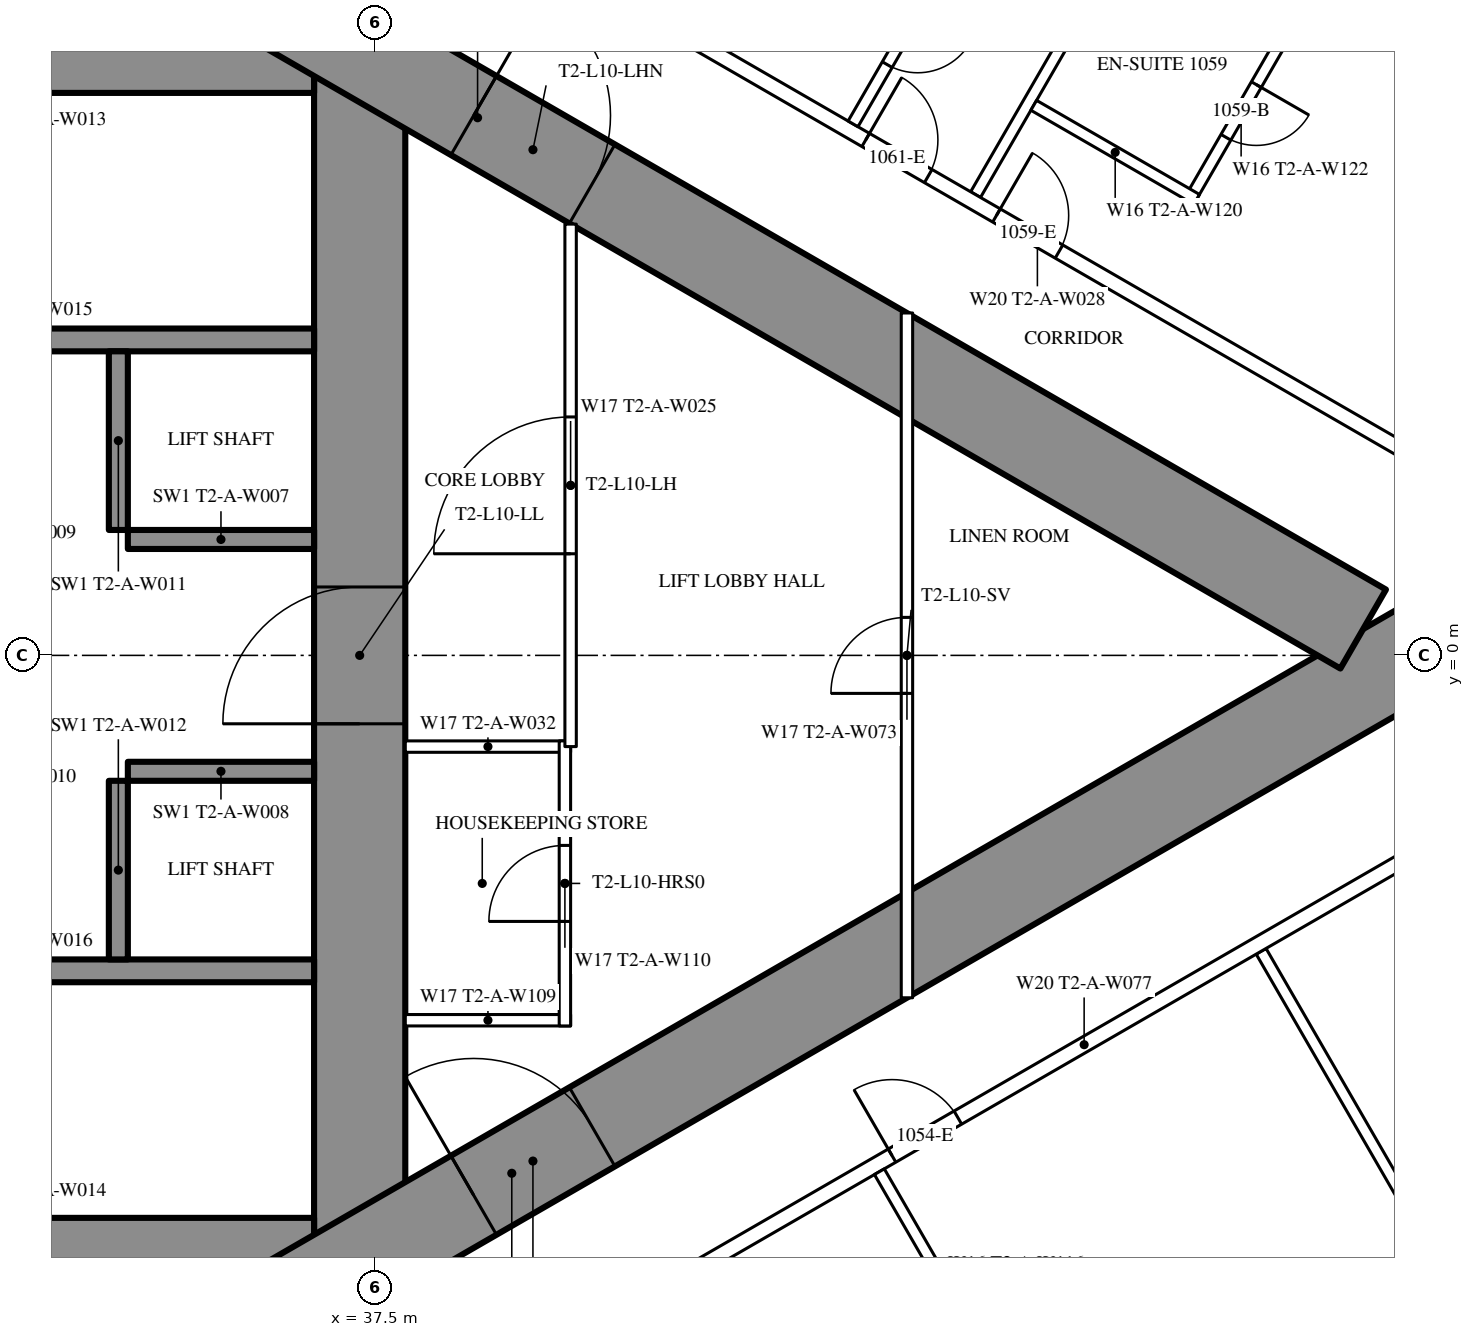
"""IFC4 building model, lengths in metres.
Left out: names, types, materials, properties, quantities, classifications, styles, units other than length and angle.
Written with IfcOpenShell. Run it as: python <this file> out.ifc"""

import sys

from ifc_helpers import new_model, si_unit, direction, frame, frame_2d, origin, place, context, subcontext, project, spatial, rectangle, extrude, element, fill, save


model = new_model("IFC4")
c1 = context("Model", 3, precision=1e-05, world=origin(), true_north=direction((0.0, 1.0)))
c2 = subcontext(c1, "Body", "Model", "MODEL_VIEW")
j1 = project(units=[si_unit("LENGTHUNIT", "METRE"), si_unit("PLANEANGLEUNIT", "RADIAN")], contexts=[c1])
p1 = place(None, origin())
s1 = spatial("IfcSite", under=j1, at=p1, CompositionType="ELEMENT")
p2 = place(p1, origin())
s2 = spatial("IfcBuilding", under=s1, at=p2, CompositionType="ELEMENT")
p3 = place(p2, frame((0.0, 0.0, 42.5)))
s3 = spatial("IfcBuildingStorey", under=s2, at=p3, CompositionType="ELEMENT", Elevation=42.5)
p4 = place(p3, frame((37.3, -8.6, 0.0), z_axis=(0.0, 0.0, 1.0), x_axis=(0.0, 1.0, 0.0)))
e1 = element("IfcWall", 1, at=p4, inside=s3, PredefinedType="SHEAR", context=c2, shape_type="SweptSolid", body=[
    extrude(rectangle(XDim=17.2, YDim=1.2, at=frame_2d((8.6, 0.0))), origin(), (0.0, 0.0, 1.0), 3.5),
])
p5 = place(p4, frame((7.7, 0.0, 0.0)))
e2 = element("IfcOpeningElement", 2, at=p5, cuts=e1, PredefinedType="OPENING", context=c2, shape_type="SweptSolid", body=[
    extrude(rectangle(XDim=1.8, YDim=2.2, at=frame_2d((0.9, 1.1))), frame((0.0, 0.61, 0.0), z_axis=(0.0, -1.0, 0.0), x_axis=(1.0, 0.0, 0.0)), (0.0, 0.0, 1.0), 1.22),
])
p6 = place(p3, frame((28.3, -8.0, 0.0), z_axis=(0.0, 0.0, 1.0), x_axis=(1.0, 0.0, 0.0)))
e3 = element("IfcWall", 3, at=p6, inside=s3, PredefinedType="SHEAR", context=c2, shape_type="SweptSolid", body=[
    extrude(rectangle(XDim=8.4, YDim=1.2, at=frame_2d((4.2, 0.0))), origin(), (0.0, 0.0, 1.0), 3.5),
])
p7 = place(p6, frame((0.25, 0.0, 0.0)))
e4 = element("IfcOpeningElement", 4, at=p7, cuts=e3, PredefinedType="OPENING", context=c2, shape_type="SweptSolid", body=[
    extrude(rectangle(XDim=1.0, YDim=2.2, at=frame_2d((0.5, 1.1))), frame((0.0, 0.61, 0.0), z_axis=(0.0, -1.0, 0.0), x_axis=(1.0, 0.0, 0.0)), (0.0, 0.0, 1.0), 1.22),
])
p8 = place(p3, frame((28.3, 8.0, 0.0), z_axis=(0.0, 0.0, 1.0), x_axis=(1.0, 0.0, 0.0)))
e5 = element("IfcWall", 5, at=p8, inside=s3, PredefinedType="SHEAR", context=c2, shape_type="SweptSolid", body=[
    extrude(rectangle(XDim=8.4, YDim=1.2, at=frame_2d((4.2, 0.0))), origin(), (0.0, 0.0, 1.0), 3.5),
])
p9 = place(p8, frame((0.25, 0.0, 0.0)))
e6 = element("IfcOpeningElement", 6, at=p9, cuts=e5, PredefinedType="OPENING", context=c2, shape_type="SweptSolid", body=[
    extrude(rectangle(XDim=1.0, YDim=2.2, at=frame_2d((0.5, 1.1))), frame((0.0, 0.61, 0.0), z_axis=(0.0, -1.0, 0.0), x_axis=(1.0, 0.0, 0.0)), (0.0, 0.0, 1.0), 1.22),
])
for number, where, z_axis, x_axis in (
    (7, (28.3, -4.15, 0.0), (0.0, 0.0, 1.0), (1.0, 0.0, 0.0)),
    (8, (28.3, 4.15, 0.0), (0.0, 0.0, 1.0), (1.0, 0.0, 0.0)),
):
    element("IfcWall", number, at=place(p3, frame(where, z_axis=z_axis, x_axis=x_axis)), inside=s3, PredefinedType="SHEAR", context=c2, shape_type="SweptSolid", body=[
        extrude(rectangle(XDim=8.4, YDim=0.3, at=frame_2d((4.2, 0.0))), origin(), (0.0, 0.0, 1.0), 3.5),
    ])
p10 = place(p3, frame((34.125, -4.0, 0.0), z_axis=(0.0, 0.0, 1.0), x_axis=(0.0, 1.0, 0.0)))
e9 = element("IfcWall", 9, at=p10, inside=s3, PredefinedType="SHEAR", context=c2, shape_type="SweptSolid", body=[
    extrude(rectangle(XDim=2.35, YDim=0.25, at=frame_2d((1.175, 0.0))), origin(), (0.0, 0.0, 1.0), 3.5),
])
p11 = place(p3, frame((34.25, -1.525, 0.0), z_axis=(0.0, 0.0, 1.0), x_axis=(1.0, 0.0, 0.0)))
e10 = element("IfcWall", 10, at=p11, inside=s3, PredefinedType="SHEAR", context=c2, shape_type="SweptSolid", body=[
    extrude(rectangle(XDim=2.45, YDim=0.25, at=frame_2d((1.225, 0.0))), origin(), (0.0, 0.0, 1.0), 3.5),
])
p12 = place(p3, frame((34.125, 1.65, 0.0), z_axis=(0.0, 0.0, 1.0), x_axis=(0.0, 1.0, 0.0)))
e11 = element("IfcWall", 11, at=p12, inside=s3, PredefinedType="SHEAR", context=c2, shape_type="SweptSolid", body=[
    extrude(rectangle(XDim=2.35, YDim=0.25, at=frame_2d((1.175, 0.0))), origin(), (0.0, 0.0, 1.0), 3.5),
])
p13 = place(p3, frame((34.25, 1.525, 0.0), z_axis=(0.0, 0.0, 1.0), x_axis=(1.0, 0.0, 0.0)))
e12 = element("IfcWall", 12, at=p13, inside=s3, PredefinedType="SHEAR", context=c2, shape_type="SweptSolid", body=[
    extrude(rectangle(XDim=2.45, YDim=0.25, at=frame_2d((1.225, 0.0))), origin(), (0.0, 0.0, 1.0), 3.5),
])
p14 = place(p3, frame((27.2, -13.8, 0.0), z_axis=(0.0, 0.0, 1.0), x_axis=(0.866027159892, 0.499996958321, 0.0)))
e13 = element("IfcWall", 13, at=p14, inside=s3, PredefinedType="SHEAR", context=c2, shape_type="SweptSolid", body=[
    extrude(rectangle(XDim=27.947, YDim=1.2, at=frame_2d((13.973, 0.0))), origin(), (0.0, 0.0, 1.0), 3.5),
])
p15 = place(p14, frame((4.6, 0.0, 0.0)))
e14 = element("IfcOpeningElement", 14, at=p15, cuts=e13, PredefinedType="OPENING", context=c2, shape_type="SweptSolid", body=[
    extrude(rectangle(XDim=1.0, YDim=2.2, at=frame_2d((0.5, 1.1))), frame((0.0, 0.61, 0.0), z_axis=(0.0, -1.0, 0.0), x_axis=(1.0, 0.0, 0.0)), (0.0, 0.0, 1.0), 1.22),
])
p16 = place(p14, frame((13.395, 0.0, 0.0)))
e15 = element("IfcOpeningElement", 15, at=p16, cuts=e13, PredefinedType="OPENING", context=c2, shape_type="SweptSolid", body=[
    extrude(rectangle(XDim=1.8, YDim=2.2, at=frame_2d((0.9, 1.1))), frame((0.0, 0.61, 0.0), z_axis=(0.0, -1.0, 0.0), x_axis=(1.0, 0.0, 0.0)), (0.0, 0.0, 1.0), 1.22),
])
p17 = place(p3, frame((27.2, 13.8, 0.0), z_axis=(0.0, 0.0, 1.0), x_axis=(0.866024515034, -0.500001539357, 0.0)))
e16 = element("IfcWall", 16, at=p17, inside=s3, PredefinedType="SHEAR", context=c2, shape_type="SweptSolid", body=[
    extrude(rectangle(XDim=26.907, YDim=1.2, at=frame_2d((13.454, 0.0))), origin(), (0.0, 0.0, 1.0), 3.5),
])
p18 = place(p17, frame((4.6, 0.0, 0.0)))
e17 = element("IfcOpeningElement", 17, at=p18, cuts=e16, PredefinedType="OPENING", context=c2, shape_type="SweptSolid", body=[
    extrude(rectangle(XDim=1.0, YDim=2.2, at=frame_2d((0.5, 1.1))), frame((0.0, 0.61, 0.0), z_axis=(0.0, -1.0, 0.0), x_axis=(1.0, 0.0, 0.0)), (0.0, 0.0, 1.0), 1.22),
])
p19 = place(p17, frame((13.395, 0.0, 0.0)))
e18 = element("IfcOpeningElement", 18, at=p19, cuts=e16, PredefinedType="OPENING", context=c2, shape_type="SweptSolid", body=[
    extrude(rectangle(XDim=1.8, YDim=2.2, at=frame_2d((0.9, 1.1))), frame((0.0, 0.61, 0.0), z_axis=(0.0, -1.0, 0.0), x_axis=(1.0, 0.0, 0.0)), (0.0, 0.0, 1.0), 1.22),
])
p20 = place(p3, frame((49.159, -3.893, 0.0), z_axis=(0.0, 0.0, 1.0), x_axis=(0.499998773722, -0.866026111775, 0.0)))
e19 = element("IfcWall", 19, at=p20, inside=s3, PredefinedType="PARTITIONING", context=c2, shape_type="SweptSolid", body=[
    extrude(rectangle(XDim=9.892, YDim=0.15, at=frame_2d((4.946, 0.0))), origin(), (0.0, 0.0, 1.0), 2.25),
])
p21 = place(p3, frame((45.403, 6.062, 0.0), z_axis=(0.0, 0.0, 1.0), x_axis=(0.500013434677, 0.866017647131, 0.0)))
e20 = element("IfcWall", 20, at=p21, inside=s3, PredefinedType="PARTITIONING", context=c2, shape_type="SweptSolid", body=[
    extrude(rectangle(XDim=9.902, YDim=0.15, at=frame_2d((4.951, 0.0))), origin(), (0.0, 0.0, 1.0), 2.25),
])
p22 = place(p3, frame((37.96, -10.243, 0.0), z_axis=(0.0, 0.0, 1.0), x_axis=(0.866026429433, 0.499998223521, 0.0)))
e21 = element("IfcWall", 21, at=p22, inside=s3, PredefinedType="PARTITIONING", context=c2, shape_type="SweptSolid", body=[
    extrude(rectangle(XDim=20.487, YDim=0.2, at=frame_2d((10.243, 0.0))), origin(), (0.0, 0.0, 1.0), 3.25),
])
p23 = place(p22, frame((7.325, 0.0, 0.0)))
e22 = element("IfcOpeningElement", 22, at=p23, cuts=e21, PredefinedType="OPENING", context=c2, shape_type="SweptSolid", body=[
    extrude(rectangle(XDim=1.0, YDim=2.2, at=frame_2d((0.5, 1.1))), frame((0.0, 0.11, 0.0), z_axis=(0.0, -1.0, 0.0), x_axis=(1.0, 0.0, 0.0)), (0.0, 0.0, 1.0), 0.22),
])
p24 = place(p22, frame((18.937, 0.0, 0.0)))
e23 = element("IfcOpeningElement", 23, at=p24, cuts=e21, PredefinedType="OPENING", context=c2, shape_type="SweptSolid", body=[
    extrude(rectangle(XDim=0.95, YDim=2.2, at=frame_2d((0.475, 1.1))), frame((0.0, 0.11, 0.0), z_axis=(0.0, -1.0, 0.0), x_axis=(1.0, 0.0, 0.0)), (0.0, 0.0, 1.0), 0.22),
])
p25 = place(p22, frame((0.6, 0.0, 0.0)))
e24 = element("IfcOpeningElement", 24, at=p25, cuts=e21, PredefinedType="OPENING", context=c2, shape_type="SweptSolid", body=[
    extrude(rectangle(XDim=0.95, YDim=2.2, at=frame_2d((0.475, 1.1))), frame((0.0, 0.11, 0.0), z_axis=(0.0, -1.0, 0.0), x_axis=(1.0, 0.0, 0.0)), (0.0, 0.0, 1.0), 0.22),
])
p26 = place(p3, frame((36.834, 10.894, 0.0), z_axis=(0.0, 0.0, 1.0), x_axis=(0.866028157229, -0.499995230863, 0.0)))
e25 = element("IfcWall", 25, at=p26, inside=s3, PredefinedType="PARTITIONING", context=c2, shape_type="SweptSolid", body=[
    extrude(rectangle(XDim=21.667, YDim=0.2, at=frame_2d((10.833, 0.0))), origin(), (0.0, 0.0, 1.0), 3.25),
])
p27 = place(p26, frame((18.885, 0.0, 0.0)))
e26 = element("IfcOpeningElement", 26, at=p27, cuts=e25, PredefinedType="OPENING", context=c2, shape_type="SweptSolid", body=[
    extrude(rectangle(XDim=0.95, YDim=2.2, at=frame_2d((0.475, 1.1))), frame((0.0, 0.11, 0.0), z_axis=(0.0, -1.0, 0.0), x_axis=(1.0, 0.0, 0.0)), (0.0, 0.0, 1.0), 0.22),
])
p28 = place(p26, frame((10.212, 0.0, 0.0)))
e27 = element("IfcOpeningElement", 27, at=p28, cuts=e25, PredefinedType="OPENING", context=c2, shape_type="SweptSolid", body=[
    extrude(rectangle(XDim=0.95, YDim=2.2, at=frame_2d((0.475, 1.1))), frame((0.0, 0.11, 0.0), z_axis=(0.0, -1.0, 0.0), x_axis=(1.0, 0.0, 0.0)), (0.0, 0.0, 1.0), 0.22),
])
p29 = place(p26, frame((8.225, 0.0, 0.0)))
e28 = element("IfcOpeningElement", 28, at=p29, cuts=e25, PredefinedType="OPENING", context=c2, shape_type="SweptSolid", body=[
    extrude(rectangle(XDim=0.95, YDim=2.2, at=frame_2d((0.475, 1.1))), frame((0.0, 0.11, 0.0), z_axis=(0.0, -1.0, 0.0), x_axis=(1.0, 0.0, 0.0)), (0.0, 0.0, 1.0), 0.22),
])
p30 = place(p26, frame((1.825, 0.0, 0.0)))
e29 = element("IfcOpeningElement", 29, at=p30, cuts=e25, PredefinedType="OPENING", context=c2, shape_type="SweptSolid", body=[
    extrude(rectangle(XDim=0.95, YDim=2.2, at=frame_2d((0.475, 1.1))), frame((0.0, 0.11, 0.0), z_axis=(0.0, -1.0, 0.0), x_axis=(1.0, 0.0, 0.0)), (0.0, 0.0, 1.0), 0.22),
])
p31 = place(p26, frame((0.246, 0.0, 0.0)))
e30 = element("IfcOpeningElement", 30, at=p31, cuts=e25, PredefinedType="OPENING", context=c2, shape_type="SweptSolid", body=[
    extrude(rectangle(XDim=0.9, YDim=2.2, at=frame_2d((0.45, 1.1))), frame((0.0, 0.11, 0.0), z_axis=(0.0, -1.0, 0.0), x_axis=(1.0, 0.0, 0.0)), (0.0, 0.0, 1.0), 0.22),
])
p32 = place(p3, frame((44.137, -6.792, 0.0), z_axis=(0.0, 0.0, 1.0), x_axis=(0.49994636267, -0.866056369097, 0.0)))
e31 = element("IfcWall", 31, at=p32, inside=s3, PredefinedType="PARTITIONING", context=c2, shape_type="SweptSolid", body=[
    extrude(rectangle(XDim=2.8, YDim=0.15, at=frame_2d((1.4, 0.0))), origin(), (0.0, 0.0, 1.0), 3.25),
])
p33 = place(p32, frame((1.55, 0.0, 0.0)))
e32 = element("IfcOpeningElement", 32, at=p33, cuts=e31, PredefinedType="OPENING", context=c2, shape_type="SweptSolid", body=[
    extrude(rectangle(XDim=1.0, YDim=2.2, at=frame_2d((0.5, 1.1))), frame((0.0, 0.085, 0.0), z_axis=(0.0, -1.0, 0.0), x_axis=(1.0, 0.0, 0.0)), (0.0, 0.0, 1.0), 0.17),
])
p34 = place(p3, frame((48.246, 6.037, 0.0), z_axis=(0.0, 0.0, 1.0), x_axis=(0.500006934395, 0.866021400173, 0.0)))
e33 = element("IfcWall", 33, at=p34, inside=s3, PredefinedType="PARTITIONING", context=c2, shape_type="SweptSolid", body=[
    extrude(rectangle(XDim=2.6, YDim=0.15, at=frame_2d((1.3, 0.0))), origin(), (0.0, 0.0, 1.0), 3.25),
])
p35 = place(p34, frame((0.9, 0.0, 0.0)))
e34 = element("IfcOpeningElement", 34, at=p35, cuts=e33, PredefinedType="OPENING", context=c2, shape_type="SweptSolid", body=[
    extrude(rectangle(XDim=0.8, YDim=2.2, at=frame_2d((0.4, 1.1))), frame((0.0, 0.085, 0.0), z_axis=(0.0, -1.0, 0.0), x_axis=(1.0, 0.0, 0.0)), (0.0, 0.0, 1.0), 0.17),
])
p36 = place(p3, frame((46.168, 7.237, 0.0), z_axis=(0.0, 0.0, 1.0), x_axis=(0.866006523861, -0.500032699561, 0.0)))
e35 = element("IfcWall", 35, at=p36, inside=s3, PredefinedType="PARTITIONING", context=c2, shape_type="SweptSolid", body=[
    extrude(rectangle(XDim=2.475, YDim=0.15, at=frame_2d((1.237, 0.0))), origin(), (0.0, 0.0, 1.0), 3.25),
])
p37 = place(p3, frame((43.791, 6.993, 0.0), z_axis=(0.0, 0.0, 1.0), x_axis=(0.500047596559, 0.865997922154, 0.0)))
e36 = element("IfcWall", 36, at=p37, inside=s3, PredefinedType="PARTITIONING", context=c2, shape_type="SweptSolid", body=[
    extrude(rectangle(XDim=2.6, YDim=0.15, at=frame_2d((1.3, 0.0))), origin(), (0.0, 0.0, 1.0), 3.25),
])
p38 = place(p37, frame((0.9, 0.0, 0.0)))
e37 = element("IfcOpeningElement", 37, at=p38, cuts=e36, PredefinedType="OPENING", context=c2, shape_type="SweptSolid", body=[
    extrude(rectangle(XDim=0.8, YDim=2.2, at=frame_2d((0.4, 1.1))), frame((0.0, 0.085, 0.0), z_axis=(0.0, -1.0, 0.0), x_axis=(1.0, 0.0, 0.0)), (0.0, 0.0, 1.0), 0.17),
])
for number, where, z_axis, x_axis in (
    (38, (37.9, -1.2, 0.0), (0.0, 0.0, 1.0), (1.0, 0.0, 0.0)),
    (39, (37.9, -4.8, 0.0), (0.0, 0.0, 1.0), (1.0, 0.0, 0.0)),
):
    element("IfcWall", number, at=place(p3, frame(where, z_axis=z_axis, x_axis=x_axis)), inside=s3, PredefinedType="PARTITIONING", context=c2, shape_type="SweptSolid", body=[
        extrude(rectangle(XDim=2.175, YDim=0.15, at=frame_2d((1.087, 0.0))), origin(), (0.0, 0.0, 1.0), 3.25),
    ])
p39 = place(p3, frame((40.0, -4.875, 0.0), z_axis=(0.0, 0.0, 1.0), x_axis=(0.0, 1.0, 0.0)))
e40 = element("IfcWall", 40, at=p39, inside=s3, PredefinedType="PARTITIONING", context=c2, shape_type="SweptSolid", body=[
    extrude(rectangle(XDim=3.75, YDim=0.15, at=frame_2d((1.875, 0.0))), origin(), (0.0, 0.0, 1.0), 3.25),
])
p40 = place(p39, frame((1.375, 0.0, 0.0)))
e41 = element("IfcOpeningElement", 41, at=p40, cuts=e40, PredefinedType="OPENING", context=c2, shape_type="SweptSolid", body=[
    extrude(rectangle(XDim=1.0, YDim=2.2, at=frame_2d((0.5, 1.1))), frame((0.0, 0.085, 0.0), z_axis=(0.0, -1.0, 0.0), x_axis=(1.0, 0.0, 0.0)), (0.0, 0.0, 1.0), 0.17),
])
p41 = place(p3, frame((40.075, -1.2, 0.0), z_axis=(0.0, 0.0, 1.0), x_axis=(0.0, 1.0, 0.0)))
e42 = element("IfcWall", 42, at=p41, inside=s3, PredefinedType="PARTITIONING", context=c2, shape_type="SweptSolid", body=[
    extrude(rectangle(XDim=6.874, YDim=0.15, at=frame_2d((3.437, 0.0))), origin(), (0.0, 0.0, 1.0), 3.25),
])
p42 = place(p41, frame((2.537, 0.0, 0.0)))
e43 = element("IfcOpeningElement", 43, at=p42, cuts=e42, PredefinedType="OPENING", context=c2, shape_type="SweptSolid", body=[
    extrude(rectangle(XDim=1.8, YDim=2.2, at=frame_2d((0.9, 1.1))), frame((0.0, 0.085, 0.0), z_axis=(0.0, -1.0, 0.0), x_axis=(1.0, 0.0, 0.0)), (0.0, 0.0, 1.0), 0.17),
])
p43 = place(p3, frame((44.5, -4.505, 0.0), z_axis=(0.0, 0.0, 1.0), x_axis=(0.0, 1.0, 0.0)))
e44 = element("IfcWall", 44, at=p43, inside=s3, PredefinedType="PARTITIONING", context=c2, shape_type="SweptSolid", body=[
    extrude(rectangle(XDim=9.009, YDim=0.15, at=frame_2d((4.505, 0.0))), origin(), (0.0, 0.0, 1.0), 2.45),
])
p44 = place(p43, frame((4.005, 0.0, 0.0)))
e45 = element("IfcOpeningElement", 45, at=p44, cuts=e44, PredefinedType="OPENING", context=c2, shape_type="SweptSolid", body=[
    extrude(rectangle(XDim=1.0, YDim=2.2, at=frame_2d((0.5, 1.1))), frame((0.0, 0.085, 0.0), z_axis=(0.0, -1.0, 0.0), x_axis=(1.0, 0.0, 0.0)), (0.0, 0.0, 1.0), 0.17),
])
p45 = place(p23, origin())
e46 = element("IfcDoor", 46, at=p45, inside=s3, OperationType="SINGLE_SWING_LEFT", PredefinedType="DOOR", context=c2, shape_type="SweptSolid", body=[
    extrude(rectangle(XDim=1.0, YDim=2.2, at=frame_2d((0.5, 1.1))), frame((0.0, 0.025, 0.0), z_axis=(0.0, -1.0, 0.0), x_axis=(1.0, 0.0, 0.0)), (0.0, 0.0, 1.0), 0.05),
])
fill(e22, e46)
p46 = place(p35, origin())
e47 = element("IfcDoor", 47, at=p46, inside=s3, OperationType="SINGLE_SWING_RIGHT", PredefinedType="DOOR", context=c2, shape_type="SweptSolid", body=[
    extrude(rectangle(XDim=0.8, YDim=2.2, at=frame_2d((0.4, 1.1))), frame((0.0, 0.025, 0.0), z_axis=(0.0, -1.0, 0.0), x_axis=(1.0, 0.0, 0.0)), (0.0, 0.0, 1.0), 0.05),
])
fill(e34, e47)
p47 = place(p28, origin())
e48 = element("IfcDoor", 48, at=p47, inside=s3, OperationType="SINGLE_SWING_LEFT", PredefinedType="DOOR", context=c2, shape_type="SweptSolid", body=[
    extrude(rectangle(XDim=0.95, YDim=2.2, at=frame_2d((0.475, 1.1))), frame((0.0, 0.025, 0.0), z_axis=(0.0, -1.0, 0.0), x_axis=(1.0, 0.0, 0.0)), (0.0, 0.0, 1.0), 0.05),
])
fill(e27, e48)
p48 = place(p38, origin())
e49 = element("IfcDoor", 49, at=p48, inside=s3, OperationType="SINGLE_SWING_RIGHT", PredefinedType="DOOR", context=c2, shape_type="SweptSolid", body=[
    extrude(rectangle(XDim=0.8, YDim=2.2, at=frame_2d((0.4, 1.1))), frame((0.0, 0.025, 0.0), z_axis=(0.0, -1.0, 0.0), x_axis=(1.0, 0.0, 0.0)), (0.0, 0.0, 1.0), 0.05),
])
fill(e37, e49)
p49 = place(p29, origin())
e50 = element("IfcDoor", 50, at=p49, inside=s3, OperationType="SINGLE_SWING_LEFT", PredefinedType="DOOR", context=c2, shape_type="SweptSolid", body=[
    extrude(rectangle(XDim=0.95, YDim=2.2, at=frame_2d((0.475, 1.1))), frame((0.0, 0.025, 0.0), z_axis=(0.0, -1.0, 0.0), x_axis=(1.0, 0.0, 0.0)), (0.0, 0.0, 1.0), 0.05),
])
fill(e28, e50)
p50 = place(p40, origin())
e51 = element("IfcDoor", 51, at=p50, inside=s3, OperationType="SINGLE_SWING_LEFT", PredefinedType="DOOR", context=c2, shape_type="SweptSolid", body=[
    extrude(rectangle(XDim=1.0, YDim=2.2, at=frame_2d((0.5, 1.1))), frame((0.0, 0.025, 0.0), z_axis=(0.0, -1.0, 0.0), x_axis=(1.0, 0.0, 0.0)), (0.0, 0.0, 1.0), 0.05),
])
fill(e41, e51)
p51 = place(p42, origin())
e52 = element("IfcDoor", 52, at=p51, inside=s3, OperationType="DOUBLE_DOOR_SINGLE_SWING", PredefinedType="DOOR", context=c2, shape_type="SweptSolid", body=[
    extrude(rectangle(XDim=1.8, YDim=2.2, at=frame_2d((0.9, 1.1))), frame((0.0, 0.025, 0.0), z_axis=(0.0, -1.0, 0.0), x_axis=(1.0, 0.0, 0.0)), (0.0, 0.0, 1.0), 0.05),
])
fill(e43, e52)
p52 = place(p44, origin())
e53 = element("IfcDoor", 53, at=p52, inside=s3, OperationType="SINGLE_SWING_LEFT", PredefinedType="DOOR", context=c2, shape_type="SweptSolid", body=[
    extrude(rectangle(XDim=1.0, YDim=2.2, at=frame_2d((0.5, 1.1))), frame((0.0, 0.025, 0.0), z_axis=(0.0, -1.0, 0.0), x_axis=(1.0, 0.0, 0.0)), (0.0, 0.0, 1.0), 0.05),
])
fill(e45, e53)
p53 = place(p16, origin())
e54 = element("IfcDoor", 54, at=p53, inside=s3, OperationType="DOUBLE_DOOR_SINGLE_SWING", PredefinedType="DOOR", context=c2, shape_type="SweptSolid", body=[
    extrude(rectangle(XDim=1.8, YDim=2.2, at=frame_2d((0.9, 1.1))), frame((0.0, 0.025, 0.0), z_axis=(0.0, -1.0, 0.0), x_axis=(1.0, 0.0, 0.0)), (0.0, 0.0, 1.0), 0.05),
])
fill(e15, e54)
p54 = place(p19, origin())
e55 = element("IfcDoor", 55, at=p54, inside=s3, OperationType="DOUBLE_DOOR_SINGLE_SWING", PredefinedType="DOOR", context=c2, shape_type="SweptSolid", body=[
    extrude(rectangle(XDim=1.8, YDim=2.2, at=frame_2d((0.9, 1.1))), frame((0.0, 0.025, 0.0), z_axis=(0.0, -1.0, 0.0), x_axis=(1.0, 0.0, 0.0)), (0.0, 0.0, 1.0), 0.05),
])
fill(e18, e55)
p55 = place(p5, origin())
e56 = element("IfcDoor", 56, at=p55, inside=s3, OperationType="DOUBLE_DOOR_SINGLE_SWING", PredefinedType="DOOR", context=c2, shape_type="SweptSolid", body=[
    extrude(rectangle(XDim=1.8, YDim=2.2, at=frame_2d((0.9, 1.1))), frame((0.0, 0.025, 0.0), z_axis=(0.0, -1.0, 0.0), x_axis=(1.0, 0.0, 0.0)), (0.0, 0.0, 1.0), 0.05),
])
fill(e2, e56)
save(model, sys.argv[1])
